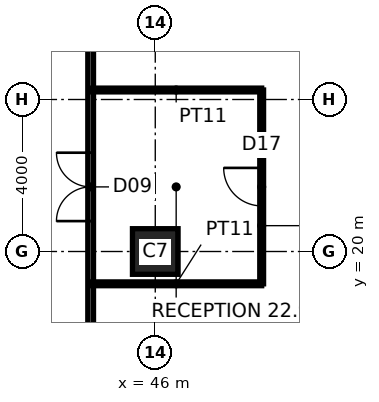
"""IFC4 building model, lengths in metres.
Left out: names, types, materials, properties, quantities, classifications, styles, units other than length and angle.
Written with IfcOpenShell. Run it as: python <this file> out.ifc"""

import sys

from ifc_helpers import new_model, si_unit, direction, frame, frame_2d, origin, origin_2d, place, context, subcontext, project, spatial, rectangle, hollow_rectangle, extrude, element, fill, save


model = new_model("IFC4")
c1 = context("Model", 3, precision=1e-05, world=origin(), true_north=direction((0.0, 1.0)))
c2 = subcontext(c1, "Body", "Model", "MODEL_VIEW")
j1 = project(units=[si_unit("LENGTHUNIT", "METRE"), si_unit("PLANEANGLEUNIT", "RADIAN")], contexts=[c1])
p1 = place(None, origin())
s1 = spatial("IfcSite", under=j1, at=p1, CompositionType="ELEMENT")
p2 = place(p1, origin())
s2 = spatial("IfcBuilding", under=s1, at=p2, CompositionType="ELEMENT")
p3 = place(p2, frame((0.0, 0.0, 15.0)))
s3 = spatial("IfcBuildingStorey", under=s2, at=p3, CompositionType="ELEMENT", Elevation=15.0)
p4 = place(p3, frame((46.0, 20.0, 0.0), z_axis=(0.0, 0.0, 1.0), x_axis=(1.0, 0.0, 0.0)))
e1 = element("IfcColumn", 1, at=p4, inside=s3, PredefinedType="COLUMN", context=c2, shape_type="SweptSolid", body=[
    extrude(hollow_rectangle(XDim=1.2, YDim=1.2, WallThickness=0.1, at=origin_2d()), origin(), (0.0, 0.0, 1.0), 4.0),
])
p5 = place(p3, frame((44.3, 15.225, 0.0), z_axis=(0.0, 0.0, 1.0), x_axis=(0.0, 1.0, 0.0)))
e2 = element("IfcWall", 2, at=p5, inside=s3, PredefinedType="PARTITIONING", context=c2, shape_type="SweptSolid", body=[
    extrude(rectangle(XDim=23.55, YDim=0.15, at=frame_2d((11.775, 0.0))), origin(), (0.0, 0.0, 1.0), 3.85),
])
p6 = place(p5, frame((5.575, 0.0, 0.0)))
e3 = element("IfcOpeningElement", 3, at=p6, cuts=e2, PredefinedType="OPENING", context=c2, shape_type="SweptSolid", body=[
    extrude(rectangle(XDim=1.8, YDim=2.4, at=frame_2d((0.9, 1.2))), frame((0.0, 0.085, 0.0), z_axis=(0.0, -1.0, 0.0), x_axis=(1.0, 0.0, 0.0)), (0.0, 0.0, 1.0), 0.17),
])
p7 = place(p5, frame((16.825, 0.0, 0.0)))
e4 = element("IfcOpeningElement", 4, at=p7, cuts=e2, PredefinedType="OPENING", context=c2, shape_type="SweptSolid", body=[
    extrude(rectangle(XDim=1.8, YDim=2.4, at=frame_2d((0.9, 1.2))), frame((0.0, 0.085, 0.0), z_axis=(0.0, -1.0, 0.0), x_axis=(1.0, 0.0, 0.0)), (0.0, 0.0, 1.0), 0.17),
])
p8 = place(p3, frame((44.3, 19.15, 0.0), z_axis=(0.0, 0.0, 1.0), x_axis=(1.0, 0.0, 0.0)))
e5 = element("IfcWall", 5, at=p8, inside=s3, PredefinedType="PARTITIONING", context=c2, shape_type="SweptSolid", body=[
    extrude(rectangle(XDim=4.5, YDim=0.1, at=frame_2d((2.25, 0.0))), origin(), (0.0, 0.0, 1.0), 3.85),
])
p9 = place(p3, frame((48.8, 19.15, 0.0), z_axis=(0.0, 0.0, 1.0), x_axis=(0.0, 1.0, 0.0)))
e6 = element("IfcWall", 6, at=p9, inside=s3, PredefinedType="PARTITIONING", context=c2, shape_type="SweptSolid", body=[
    extrude(rectangle(XDim=5.1, YDim=0.1, at=frame_2d((2.55, 0.0))), origin(), (0.0, 0.0, 1.0), 3.85),
])
p10 = place(p9, frame((2.05, 0.0, 0.0)))
e7 = element("IfcOpeningElement", 7, at=p10, cuts=e6, PredefinedType="OPENING", context=c2, shape_type="SweptSolid", body=[
    extrude(rectangle(XDim=1.0, YDim=2.2, at=frame_2d((0.5, 1.1))), frame((0.0, 0.06, 0.0), z_axis=(0.0, -1.0, 0.0), x_axis=(1.0, 0.0, 0.0)), (0.0, 0.0, 1.0), 0.12),
])
p11 = place(p3, frame((48.8, 24.25, 0.0), z_axis=(0.0, 0.0, 1.0), x_axis=(-1.0, 0.0, 0.0)))
e8 = element("IfcWall", 8, at=p11, inside=s3, PredefinedType="PARTITIONING", context=c2, shape_type="SweptSolid", body=[
    extrude(rectangle(XDim=4.5, YDim=0.1, at=frame_2d((2.25, 0.0))), origin(), (0.0, 0.0, 1.0), 3.85),
])
p12 = place(p6, origin())
e9 = element("IfcDoor", 9, at=p12, inside=s3, OperationType="DOUBLE_DOOR_DOUBLE_SWING", PredefinedType="DOOR", context=c2, shape_type="SweptSolid", body=[
    extrude(rectangle(XDim=1.8, YDim=2.4, at=frame_2d((0.9, 1.2))), frame((0.0, 0.025, 0.0), z_axis=(0.0, -1.0, 0.0), x_axis=(1.0, 0.0, 0.0)), (0.0, 0.0, 1.0), 0.05),
])
fill(e3, e9)
p13 = place(p10, origin())
e10 = element("IfcDoor", 10, at=p13, inside=s3, OperationType="SINGLE_SWING_RIGHT", PredefinedType="DOOR", context=c2, shape_type="SweptSolid", body=[
    extrude(rectangle(XDim=1.0, YDim=2.2, at=frame_2d((0.5, 1.1))), frame((0.0, 0.025, 0.0), z_axis=(0.0, -1.0, 0.0), x_axis=(1.0, 0.0, 0.0)), (0.0, 0.0, 1.0), 0.05),
])
fill(e7, e10)
save(model, sys.argv[1])
